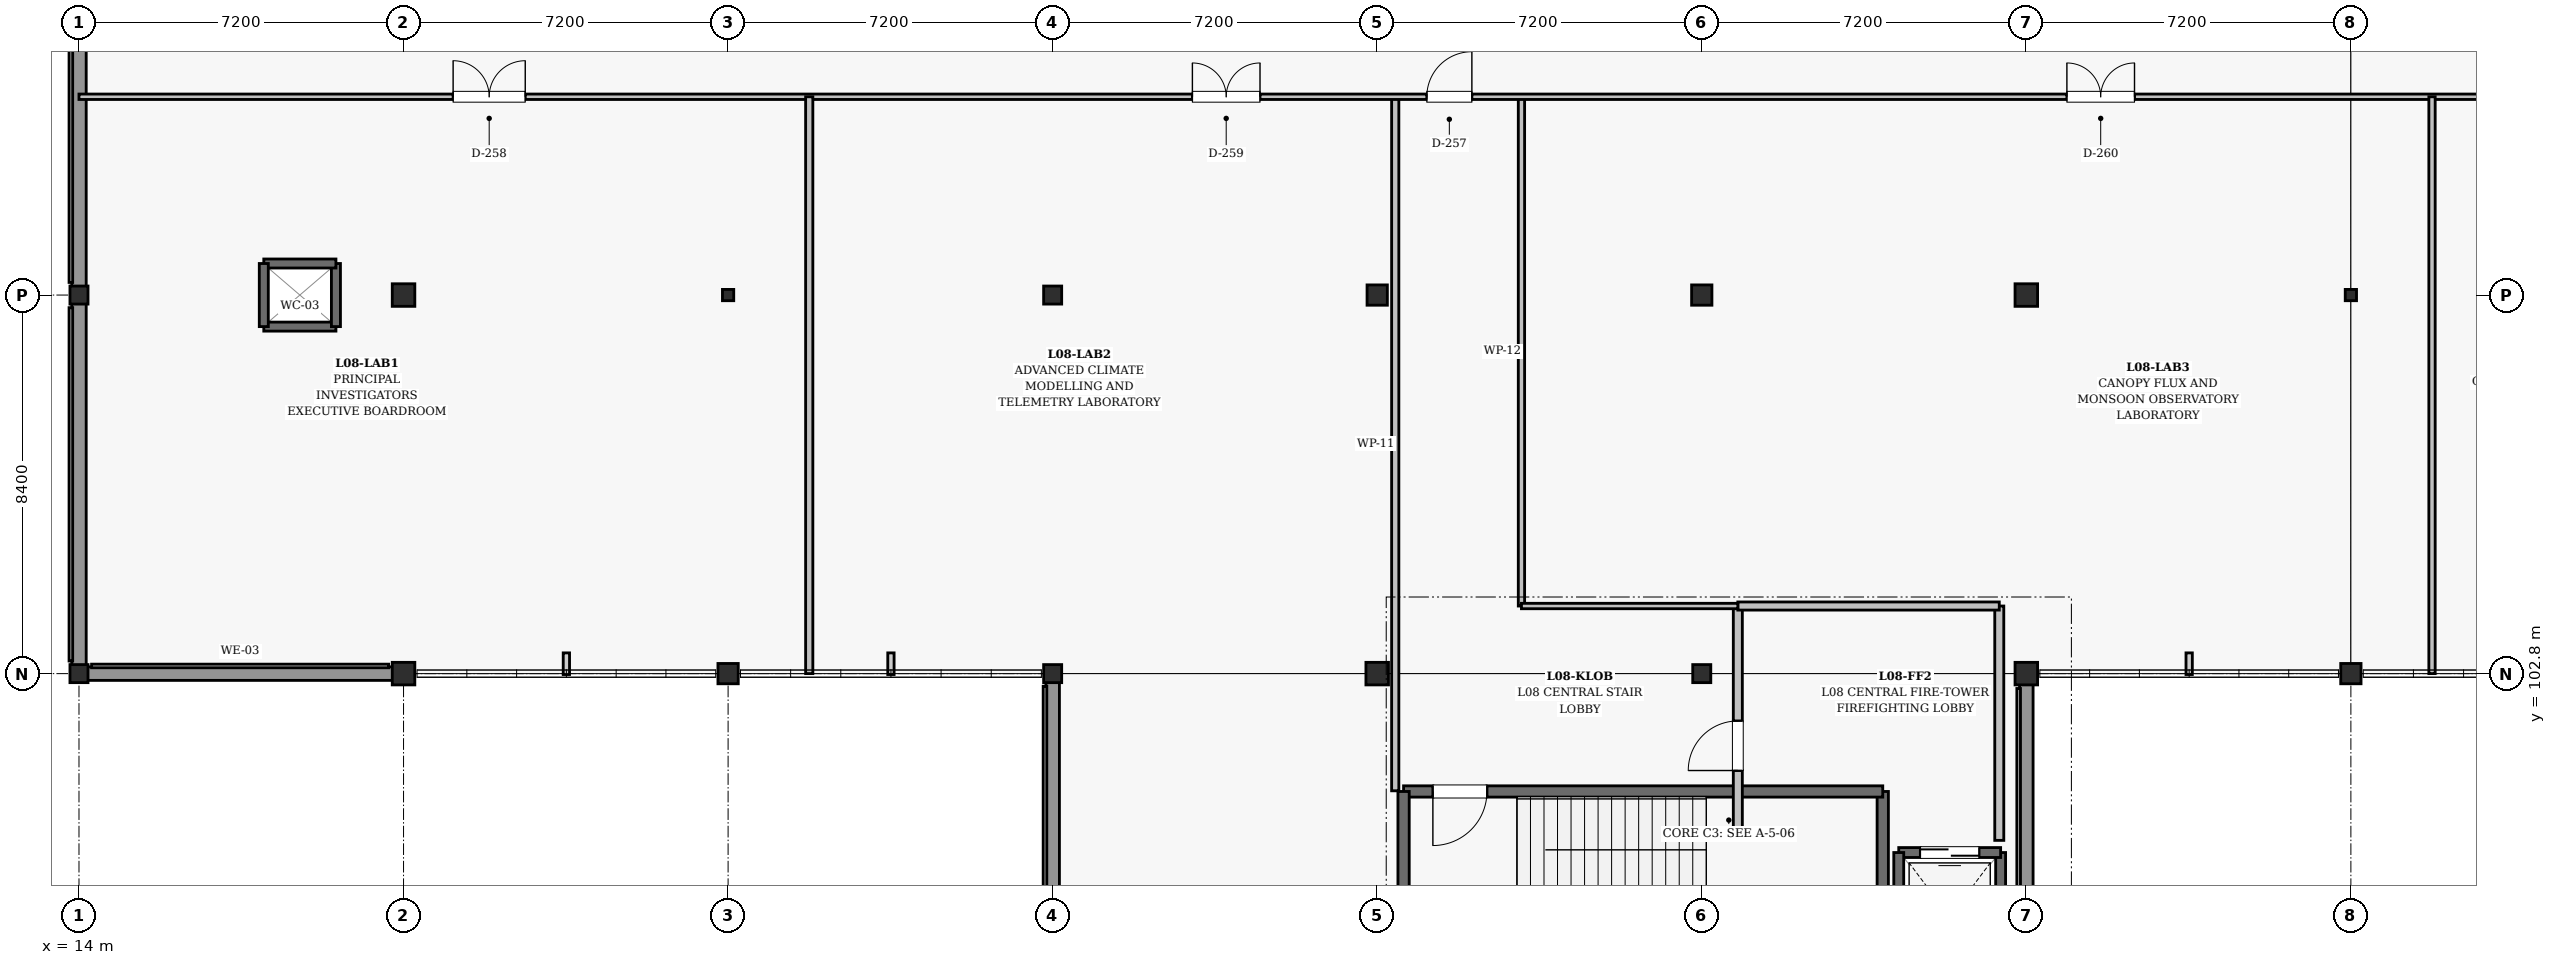
"""IFC4 building model, lengths in metres.
Left out: names, types, materials, properties, quantities, classifications, styles, units other than length and angle.
Written with IfcOpenShell. Run it as: python <this file> out.ifc"""

import sys

from ifc_helpers import new_model, si_unit, direction, frame, frame_2d, origin, origin_2d, place, context, subcontext, project, spatial, rectangle, i_section, extrude, element, fill, save


model = new_model("IFC4")
c1 = context("Model", 3, precision=1e-05, world=origin(), true_north=direction((0.0, 1.0)))
c2 = subcontext(c1, "Body", "Model", "MODEL_VIEW")
j1 = project(units=[si_unit("LENGTHUNIT", "METRE"), si_unit("PLANEANGLEUNIT", "RADIAN")], contexts=[c1])
p1 = place(None, origin())
s1 = spatial("IfcSite", under=j1, at=p1, CompositionType="ELEMENT")
p2 = place(p1, origin())
s2 = spatial("IfcBuilding", under=s1, at=p2, CompositionType="ELEMENT")
p3 = place(p2, frame((0.0, 0.0, 36.9)))
s3 = spatial("IfcBuildingStorey", under=s2, at=p3, CompositionType="ELEMENT", Elevation=36.9)
for number, where, z_axis, x_axis in (
    (1, (14.0, 102.8, 0.0), (0.0, 0.0, 1.0), (1.0, 0.0, 0.0)),
    (2, (14.0, 111.2, 0.0), (0.0, 0.0, 1.0), (1.0, 0.0, 0.0)),
):
    element("IfcColumn", number, at=place(p3, frame(where, z_axis=z_axis, x_axis=x_axis)), inside=s3, PredefinedType="COLUMN", context=c2, shape_type="SweptSolid", body=[
        extrude(rectangle(XDim=0.4, YDim=0.4, at=origin_2d()), origin(), (0.0, 0.0, 1.0), 4.5),
    ])
for number, where, z_axis, x_axis in (
    (3, (21.2, 102.8, 0.0), (0.0, 0.0, 1.0), (1.0, 0.0, 0.0)),
    (4, (21.2, 111.2, 0.0), (0.0, 0.0, 1.0), (1.0, 0.0, 0.0)),
):
    element("IfcColumn", number, at=place(p3, frame(where, z_axis=z_axis, x_axis=x_axis)), inside=s3, PredefinedType="COLUMN", context=c2, shape_type="SweptSolid", body=[
        extrude(rectangle(XDim=0.5, YDim=0.5, at=origin_2d()), origin(), (0.0, 0.0, 1.0), 4.5),
    ])
p4 = place(p3, frame((28.4, 102.8, 0.0), z_axis=(0.0, 0.0, 1.0), x_axis=(1.0, 0.0, 0.0)))
e5 = element("IfcColumn", 5, at=p4, inside=s3, PredefinedType="COLUMN", context=c2, shape_type="SweptSolid", body=[
    extrude(rectangle(XDim=0.45, YDim=0.45, at=origin_2d()), origin(), (0.0, 0.0, 1.0), 4.5),
])
p5 = place(p3, frame((28.4, 111.2, 0.0), z_axis=(0.0, 0.0, 1.0), x_axis=(1.0, 0.0, 0.0)))
e6 = element("IfcColumn", 6, at=p5, inside=s3, PredefinedType="COLUMN", context=c2, shape_type="SweptSolid", body=[
    extrude(i_section(OverallWidth=0.25, OverallDepth=0.25, WebThickness=0.009, FlangeThickness=0.01, FilletRadius=0.01, at=origin_2d()), origin(), (0.0, 0.0, 1.0), 4.5),
])
for number, where, z_axis, x_axis in (
    (7, (35.6, 102.8, 0.0), (0.0, 0.0, 1.0), (1.0, 0.0, 0.0)),
    (8, (35.6, 111.2, 0.0), (0.0, 0.0, 1.0), (1.0, 0.0, 0.0)),
):
    element("IfcColumn", number, at=place(p3, frame(where, z_axis=z_axis, x_axis=x_axis)), inside=s3, PredefinedType="COLUMN", context=c2, shape_type="SweptSolid", body=[
        extrude(rectangle(XDim=0.4, YDim=0.4, at=origin_2d()), origin(), (0.0, 0.0, 1.0), 4.5),
    ])
p6 = place(p3, frame((42.8, 102.8, 0.0), z_axis=(0.0, 0.0, 1.0), x_axis=(1.0, 0.0, 0.0)))
e9 = element("IfcColumn", 9, at=p6, inside=s3, PredefinedType="COLUMN", context=c2, shape_type="SweptSolid", body=[
    extrude(rectangle(XDim=0.5, YDim=0.5, at=origin_2d()), origin(), (0.0, 0.0, 1.0), 4.5),
])
p7 = place(p3, frame((42.8, 111.2, 0.0), z_axis=(0.0, 0.0, 1.0), x_axis=(1.0, 0.0, 0.0)))
e10 = element("IfcColumn", 10, at=p7, inside=s3, PredefinedType="COLUMN", context=c2, shape_type="SweptSolid", body=[
    extrude(rectangle(XDim=0.45, YDim=0.45, at=origin_2d()), origin(), (0.0, 0.0, 1.0), 4.5),
])
p8 = place(p3, frame((50.0, 102.8, 0.0), z_axis=(0.0, 0.0, 1.0), x_axis=(1.0, 0.0, 0.0)))
e11 = element("IfcColumn", 11, at=p8, inside=s3, PredefinedType="COLUMN", context=c2, shape_type="SweptSolid", body=[
    extrude(rectangle(XDim=0.4, YDim=0.4, at=origin_2d()), origin(), (0.0, 0.0, 1.0), 4.5),
])
p9 = place(p3, frame((50.0, 111.2, 0.0), z_axis=(0.0, 0.0, 1.0), x_axis=(1.0, 0.0, 0.0)))
e12 = element("IfcColumn", 12, at=p9, inside=s3, PredefinedType="COLUMN", context=c2, shape_type="SweptSolid", body=[
    extrude(rectangle(XDim=0.45, YDim=0.45, at=origin_2d()), origin(), (0.0, 0.0, 1.0), 4.5),
])
for number, where, z_axis, x_axis in (
    (13, (57.2, 102.8, 0.0), (0.0, 0.0, 1.0), (1.0, 0.0, 0.0)),
    (14, (57.2, 111.2, 0.0), (0.0, 0.0, 1.0), (1.0, 0.0, 0.0)),
):
    element("IfcColumn", number, at=place(p3, frame(where, z_axis=z_axis, x_axis=x_axis)), inside=s3, PredefinedType="COLUMN", context=c2, shape_type="SweptSolid", body=[
        extrude(rectangle(XDim=0.5, YDim=0.5, at=origin_2d()), origin(), (0.0, 0.0, 1.0), 4.5),
    ])
p10 = place(p3, frame((64.4, 102.8, 0.0), z_axis=(0.0, 0.0, 1.0), x_axis=(1.0, 0.0, 0.0)))
e15 = element("IfcColumn", 15, at=p10, inside=s3, PredefinedType="COLUMN", context=c2, shape_type="SweptSolid", body=[
    extrude(rectangle(XDim=0.45, YDim=0.45, at=origin_2d()), origin(), (0.0, 0.0, 1.0), 4.5),
])
p11 = place(p3, frame((64.4, 111.2, 0.0), z_axis=(0.0, 0.0, 1.0), x_axis=(1.0, 0.0, 0.0)))
e16 = element("IfcColumn", 16, at=p11, inside=s3, PredefinedType="COLUMN", context=c2, shape_type="SweptSolid", body=[
    extrude(i_section(OverallWidth=0.25, OverallDepth=0.25, WebThickness=0.009, FlangeThickness=0.01, FilletRadius=0.01, at=origin_2d()), origin(), (0.0, 0.0, 1.0), 4.5),
])
p12 = place(p3, frame((14.18, 102.8, 0.0), z_axis=(0.0, 0.0, 1.0), x_axis=(1.0, 0.0, 0.0)))
e17 = element("IfcWall", 17, at=p12, inside=s3, PredefinedType="SOLIDWALL", context=c2, shape_type="SweptSolid", body=[
    extrude(rectangle(XDim=6.79, YDim=0.3, at=frame_2d((3.395, 0.0))), origin(), (0.0, 0.0, 1.0), 3.355),
])
p13 = place(p3, frame((14.0, 102.98, 0.0), z_axis=(0.0, 0.0, 1.0), x_axis=(0.0, 1.0, 0.0)))
e18 = element("IfcWall", 18, at=p13, inside=s3, PredefinedType="SOLIDWALL", context=c2, shape_type="SweptSolid", body=[
    extrude(rectangle(XDim=8.04, YDim=0.32, at=frame_2d((4.02, 0.0))), origin(), (0.0, 0.0, 1.0), 3.355),
])
p14 = place(p3, frame((14.0, 111.38, 0.0), z_axis=(0.0, 0.0, 1.0), x_axis=(0.0, 1.0, 0.0)))
e19 = element("IfcWall", 19, at=p14, inside=s3, PredefinedType="SOLIDWALL", context=c2, shape_type="SweptSolid", body=[
    extrude(rectangle(XDim=8.015, YDim=0.32, at=frame_2d((4.008, 0.0))), origin(), (0.0, 0.0, 1.0), 3.405),
])
p15 = place(p3, frame((57.2, 94.605, 0.0), z_axis=(0.0, 0.0, 1.0), x_axis=(0.0, 1.0, 0.0)))
e20 = element("IfcWall", 20, at=p15, inside=s3, PredefinedType="SOLIDWALL", context=c2, shape_type="SweptSolid", body=[
    extrude(rectangle(XDim=7.965, YDim=0.3, at=frame_2d((3.982, 0.0))), origin(), (0.0, 0.0, 1.0), 3.355),
])
p16 = place(p3, frame((35.6, 94.63, 0.0), z_axis=(0.0, 0.0, 1.0), x_axis=(0.0, 1.0, 0.0)))
e21 = element("IfcWall", 21, at=p16, inside=s3, PredefinedType="SOLIDWALL", context=c2, shape_type="SweptSolid", body=[
    extrude(rectangle(XDim=7.99, YDim=0.3, at=frame_2d((3.995, 0.0))), origin(), (0.0, 0.0, 1.0), 2.955),
])
p17 = place(p3, frame((54.015, 95.085, 0.0), z_axis=(0.0, 0.0, 1.0), x_axis=(0.0, 1.0, 0.0)))
e22 = element("IfcWall", 22, at=p17, inside=s3, PredefinedType="SHEAR", context=c2, shape_type="SweptSolid", body=[
    extrude(rectangle(XDim=5.1, YDim=0.25, at=frame_2d((2.55, 0.0))), origin(), (0.0, 0.0, 1.0), 4.215),
])
p18 = place(p3, frame((54.015, 100.185, 0.0), z_axis=(0.0, 0.0, 1.0), x_axis=(-1.0, 0.0, 0.0)))
e23 = element("IfcWall", 23, at=p18, inside=s3, PredefinedType="SHEAR", context=c2, shape_type="SweptSolid", body=[
    extrude(rectangle(XDim=10.63, YDim=0.25, at=frame_2d((5.315, 0.0))), origin(), (0.0, 0.0, 1.0), 4.215),
])
p19 = place(p18, frame((8.78, 0.0, 0.0)))
e24 = element("IfcOpeningElement", 24, at=p19, cuts=e23, PredefinedType="OPENING", context=c2, shape_type="SweptSolid", body=[
    extrude(rectangle(XDim=1.2, YDim=2.15, at=frame_2d((0.6, 1.075))), frame((0.0, 0.135, 0.0), z_axis=(0.0, -1.0, 0.0), x_axis=(1.0, 0.0, 0.0)), (0.0, 0.0, 1.0), 0.27),
])
p20 = place(p3, frame((43.385, 100.185, 0.0), z_axis=(0.0, 0.0, 1.0), x_axis=(0.0, -1.0, 0.0)))
e25 = element("IfcWall", 25, at=p20, inside=s3, PredefinedType="SHEAR", context=c2, shape_type="SweptSolid", body=[
    extrude(rectangle(XDim=5.1, YDim=0.25, at=frame_2d((2.55, 0.0))), origin(), (0.0, 0.0, 1.0), 4.215),
])
p21 = place(p3, frame((56.63, 95.97, 0.0), z_axis=(0.0, 0.0, 1.0), x_axis=(0.0, 1.0, 0.0)))
e26 = element("IfcWall", 26, at=p21, inside=s3, PredefinedType="SHEAR", context=c2, shape_type="SweptSolid", body=[
    extrude(rectangle(XDim=2.86, YDim=0.22, at=frame_2d((1.43, 0.0))), origin(), (0.0, 0.0, 1.0), 4.215),
])
p22 = place(p3, frame((56.63, 98.83, 0.0), z_axis=(0.0, 0.0, 1.0), x_axis=(-1.0, 0.0, 0.0)))
e27 = element("IfcWall", 27, at=p22, inside=s3, PredefinedType="SHEAR", context=c2, shape_type="SweptSolid", body=[
    extrude(rectangle(XDim=2.26, YDim=0.22, at=frame_2d((1.13, 0.0))), origin(), (0.0, 0.0, 1.0), 4.215),
])
p23 = place(p22, frame((0.48, 0.0, 0.0)))
e28 = element("IfcOpeningElement", 28, at=p23, cuts=e27, PredefinedType="OPENING", context=c2, shape_type="SweptSolid", body=[
    extrude(rectangle(XDim=1.3, YDim=2.2, at=frame_2d((0.65, 1.1))), frame((0.0, 0.12, 0.0), z_axis=(0.0, -1.0, 0.0), x_axis=(1.0, 0.0, 0.0)), (0.0, 0.0, 1.0), 0.24),
])
p24 = place(p3, frame((54.37, 98.83, 0.0), z_axis=(0.0, 0.0, 1.0), x_axis=(0.0, -1.0, 0.0)))
e29 = element("IfcWall", 29, at=p24, inside=s3, PredefinedType="SHEAR", context=c2, shape_type="SweptSolid", body=[
    extrude(rectangle(XDim=2.86, YDim=0.22, at=frame_2d((1.43, 0.0))), origin(), (0.0, 0.0, 1.0), 4.215),
])
p25 = place(p3, frame((18.1, 110.5, 0.0), z_axis=(0.0, 0.0, 1.0), x_axis=(1.0, 0.0, 0.0)))
e30 = element("IfcWall", 30, at=p25, inside=s3, PredefinedType="SHEAR", context=c2, shape_type="SweptSolid", body=[
    extrude(rectangle(XDim=1.6, YDim=0.2, at=frame_2d((0.8, 0.0))), origin(), (0.0, 0.0, 1.0), 4.14),
])
p26 = place(p3, frame((19.7, 110.5, 0.0), z_axis=(0.0, 0.0, 1.0), x_axis=(0.0, 1.0, 0.0)))
e31 = element("IfcWall", 31, at=p26, inside=s3, PredefinedType="SHEAR", context=c2, shape_type="SweptSolid", body=[
    extrude(rectangle(XDim=1.4, YDim=0.2, at=frame_2d((0.7, 0.0))), origin(), (0.0, 0.0, 1.0), 4.14),
])
p27 = place(p3, frame((19.7, 111.9, 0.0), z_axis=(0.0, 0.0, 1.0), x_axis=(-1.0, 0.0, 0.0)))
e32 = element("IfcWall", 32, at=p27, inside=s3, PredefinedType="SHEAR", context=c2, shape_type="SweptSolid", body=[
    extrude(rectangle(XDim=1.6, YDim=0.2, at=frame_2d((0.8, 0.0))), origin(), (0.0, 0.0, 1.0), 4.14),
])
p28 = place(p3, frame((18.1, 111.9, 0.0), z_axis=(0.0, 0.0, 1.0), x_axis=(0.0, -1.0, 0.0)))
e33 = element("IfcWall", 33, at=p28, inside=s3, PredefinedType="SHEAR", context=c2, shape_type="SweptSolid", body=[
    extrude(rectangle(XDim=1.4, YDim=0.2, at=frame_2d((0.7, 0.0))), origin(), (0.0, 0.0, 1.0), 4.14),
])
p29 = place(p3, frame((50.8, 99.1, 0.0), z_axis=(0.0, 0.0, 1.0), x_axis=(0.0, 1.0, 0.0)))
e34 = element("IfcWall", 34, at=p29, inside=s3, PredefinedType="SOLIDWALL", context=c2, shape_type="SweptSolid", body=[
    extrude(rectangle(XDim=5.2, YDim=0.2, at=frame_2d((2.6, 0.0))), origin(), (0.0, 0.0, 1.0), 3.36),
])
p30 = place(p29, frame((1.55, 0.0, 0.0)))
e35 = element("IfcOpeningElement", 35, at=p30, cuts=e34, PredefinedType="OPENING", context=c2, shape_type="SweptSolid", body=[
    extrude(rectangle(XDim=1.1, YDim=2.15, at=frame_2d((0.55, 1.075))), frame((0.0, 0.11, 0.0), z_axis=(0.0, -1.0, 0.0), x_axis=(1.0, 0.0, 0.0)), (0.0, 0.0, 1.0), 0.22),
])
p31 = place(p3, frame((56.6, 99.1, 0.0), z_axis=(0.0, 0.0, 1.0), x_axis=(0.0, 1.0, 0.0)))
e36 = element("IfcWall", 36, at=p31, inside=s3, PredefinedType="SOLIDWALL", context=c2, shape_type="SweptSolid", body=[
    extrude(rectangle(XDim=5.2, YDim=0.2, at=frame_2d((2.6, 0.0))), origin(), (0.0, 0.0, 1.0), 3.36),
])
p32 = place(p3, frame((50.8, 104.3, 0.0), z_axis=(0.0, 0.0, 1.0), x_axis=(1.0, 0.0, 0.0)))
e37 = element("IfcWall", 37, at=p32, inside=s3, PredefinedType="SOLIDWALL", context=c2, shape_type="SweptSolid", body=[
    extrude(rectangle(XDim=5.8, YDim=0.18, at=frame_2d((2.9, 0.0))), origin(), (0.0, 0.0, 1.0), 4.12),
])
p33 = place(p3, frame((43.2, 100.2, 0.0), z_axis=(0.0, 0.0, 1.0), x_axis=(0.0, 1.0, 0.0)))
e38 = element("IfcWall", 38, at=p33, inside=s3, PredefinedType="PARTITIONING", context=c2, shape_type="SweptSolid", body=[
    extrude(rectangle(XDim=15.4, YDim=0.16, at=frame_2d((7.7, 0.0))), origin(), (0.0, 0.0, 1.0), 2.96),
])
p34 = place(p3, frame((46.0, 104.3, 0.0), z_axis=(0.0, 0.0, 1.0), x_axis=(0.0, 1.0, 0.0)))
e39 = element("IfcWall", 39, at=p34, inside=s3, PredefinedType="PARTITIONING", context=c2, shape_type="SweptSolid", body=[
    extrude(rectangle(XDim=11.3, YDim=0.14, at=frame_2d((5.65, 0.0))), origin(), (0.0, 0.0, 1.0), 3.52),
])
p35 = place(p3, frame((46.0, 104.3, 0.0), z_axis=(0.0, 0.0, 1.0), x_axis=(1.0, 0.0, 0.0)))
e40 = element("IfcWall", 40, at=p35, inside=s3, PredefinedType="PARTITIONING", context=c2, shape_type="SweptSolid", body=[
    extrude(rectangle(XDim=4.8, YDim=0.12, at=frame_2d((2.4, 0.0))), origin(), (0.0, 0.0, 1.0), 3.31),
])
p36 = place(p3, frame((14.0, 115.6, 0.0), z_axis=(0.0, 0.0, 1.0), x_axis=(1.0, 0.0, 0.0)))
e41 = element("IfcWall", 41, at=p36, inside=s3, PredefinedType="PARTITIONING", context=c2, shape_type="SweptSolid", body=[
    extrude(rectangle(XDim=72.0, YDim=0.12, at=frame_2d((36.0, 0.0))), origin(), (0.0, 0.0, 1.0), 2.96),
])
p37 = place(p36, frame((29.9, 0.0, 0.0)))
e42 = element("IfcOpeningElement", 42, at=p37, cuts=e41, PredefinedType="OPENING", context=c2, shape_type="SweptSolid", body=[
    extrude(rectangle(XDim=1.0, YDim=2.15, at=frame_2d((0.5, 1.075))), frame((0.0, 0.07, 0.0), z_axis=(0.0, -1.0, 0.0), x_axis=(1.0, 0.0, 0.0)), (0.0, 0.0, 1.0), 0.14),
])
p38 = place(p36, frame((8.3, 0.0, 0.0)))
e43 = element("IfcOpeningElement", 43, at=p38, cuts=e41, PredefinedType="OPENING", context=c2, shape_type="SweptSolid", body=[
    extrude(rectangle(XDim=1.6, YDim=2.25, at=frame_2d((0.8, 1.125))), frame((0.0, 0.07, 0.0), z_axis=(0.0, -1.0, 0.0), x_axis=(1.0, 0.0, 0.0)), (0.0, 0.0, 1.0), 0.14),
])
p39 = place(p36, frame((24.7, 0.0, 0.0)))
e44 = element("IfcOpeningElement", 44, at=p39, cuts=e41, PredefinedType="OPENING", context=c2, shape_type="SweptSolid", body=[
    extrude(rectangle(XDim=1.5, YDim=2.25, at=frame_2d((0.75, 1.125))), frame((0.0, 0.07, 0.0), z_axis=(0.0, -1.0, 0.0), x_axis=(1.0, 0.0, 0.0)), (0.0, 0.0, 1.0), 0.14),
])
p40 = place(p36, frame((44.1, 0.0, 0.0)))
e45 = element("IfcOpeningElement", 45, at=p40, cuts=e41, PredefinedType="OPENING", context=c2, shape_type="SweptSolid", body=[
    extrude(rectangle(XDim=1.5, YDim=2.25, at=frame_2d((0.75, 1.125))), frame((0.0, 0.07, 0.0), z_axis=(0.0, -1.0, 0.0), x_axis=(1.0, 0.0, 0.0)), (0.0, 0.0, 1.0), 0.14),
])
p41 = place(p36, frame((59.1, 0.0, 0.0)))
e46 = element("IfcOpeningElement", 46, at=p41, cuts=e41, PredefinedType="OPENING", context=c2, shape_type="SweptSolid", body=[
    extrude(rectangle(XDim=1.35, YDim=2.2, at=frame_2d((0.675, 1.1))), frame((0.0, 0.07, 0.0), z_axis=(0.0, -1.0, 0.0), x_axis=(1.0, 0.0, 0.0)), (0.0, 0.0, 1.0), 0.14),
])
p42 = place(p36, frame((66.8, 0.0, 0.0)))
e47 = element("IfcOpeningElement", 47, at=p42, cuts=e41, PredefinedType="OPENING", context=c2, shape_type="SweptSolid", body=[
    extrude(rectangle(XDim=1.0, YDim=2.15, at=frame_2d((0.5, 1.075))), frame((0.0, 0.07, 0.0), z_axis=(0.0, -1.0, 0.0), x_axis=(1.0, 0.0, 0.0)), (0.0, 0.0, 1.0), 0.14),
])
p43 = place(p3, frame((30.2, 102.8, 0.0), z_axis=(0.0, 0.0, 1.0), x_axis=(0.0, 1.0, 0.0)))
e48 = element("IfcWall", 48, at=p43, inside=s3, PredefinedType="PARTITIONING", context=c2, shape_type="SweptSolid", body=[
    extrude(rectangle(XDim=12.8, YDim=0.16, at=frame_2d((6.4, 0.0))), origin(), (0.0, 0.0, 1.0), 3.41),
])
p44 = place(p3, frame((66.2, 102.8, 0.0), z_axis=(0.0, 0.0, 1.0), x_axis=(0.0, 1.0, 0.0)))
e49 = element("IfcWall", 49, at=p44, inside=s3, PredefinedType="PARTITIONING", context=c2, shape_type="SweptSolid", body=[
    extrude(rectangle(XDim=12.8, YDim=0.14, at=frame_2d((6.4, 0.0))), origin(), (0.0, 0.0, 1.0), 3.41),
])
p45 = place(p19, origin())
e50 = element("IfcDoor", 50, at=p45, inside=s3, OperationType="SINGLE_SWING_RIGHT", PredefinedType="DOOR", context=c2, shape_type="SweptSolid", body=[
    extrude(rectangle(XDim=1.2, YDim=2.15, at=frame_2d((0.6, 1.075))), frame((0.0, 0.025, 0.0), z_axis=(0.0, -1.0, 0.0), x_axis=(1.0, 0.0, 0.0)), (0.0, 0.0, 1.0), 0.05),
])
fill(e24, e50)
p46 = place(p23, origin())
e51 = element("IfcDoor", 51, at=p46, inside=s3, OperationType="DOUBLE_DOOR_SLIDING", PredefinedType="DOOR", context=c2, shape_type="SweptSolid", body=[
    extrude(rectangle(XDim=1.3, YDim=2.2, at=frame_2d((0.65, 1.1))), frame((0.0, 0.025, 0.0), z_axis=(0.0, -1.0, 0.0), x_axis=(1.0, 0.0, 0.0)), (0.0, 0.0, 1.0), 0.05),
])
fill(e28, e51)
p47 = place(p30, origin())
e52 = element("IfcDoor", 52, at=p47, inside=s3, OperationType="SINGLE_SWING_LEFT", PredefinedType="DOOR", context=c2, shape_type="SweptSolid", body=[
    extrude(rectangle(XDim=1.1, YDim=2.15, at=frame_2d((0.55, 1.075))), frame((0.0, 0.025, 0.0), z_axis=(0.0, -1.0, 0.0), x_axis=(1.0, 0.0, 0.0)), (0.0, 0.0, 1.0), 0.05),
])
fill(e35, e52)
p48 = place(p37, origin())
e53 = element("IfcDoor", 53, at=p48, inside=s3, OperationType="SINGLE_SWING_RIGHT", PredefinedType="DOOR", context=c2, shape_type="SweptSolid", body=[
    extrude(rectangle(XDim=1.0, YDim=2.15, at=frame_2d((0.5, 1.075))), frame((0.0, 0.025, 0.0), z_axis=(0.0, -1.0, 0.0), x_axis=(1.0, 0.0, 0.0)), (0.0, 0.0, 1.0), 0.05),
])
fill(e42, e53)
p49 = place(p38, origin())
e54 = element("IfcDoor", 54, at=p49, inside=s3, OperationType="DOUBLE_DOOR_SINGLE_SWING", PredefinedType="DOOR", context=c2, shape_type="SweptSolid", body=[
    extrude(rectangle(XDim=1.6, YDim=2.25, at=frame_2d((0.8, 1.125))), frame((0.0, 0.025, 0.0), z_axis=(0.0, -1.0, 0.0), x_axis=(1.0, 0.0, 0.0)), (0.0, 0.0, 1.0), 0.05),
])
fill(e43, e54)
p50 = place(p39, origin())
e55 = element("IfcDoor", 55, at=p50, inside=s3, OperationType="DOUBLE_DOOR_SINGLE_SWING", PredefinedType="DOOR", context=c2, shape_type="SweptSolid", body=[
    extrude(rectangle(XDim=1.5, YDim=2.25, at=frame_2d((0.75, 1.125))), frame((0.0, 0.025, 0.0), z_axis=(0.0, -1.0, 0.0), x_axis=(1.0, 0.0, 0.0)), (0.0, 0.0, 1.0), 0.05),
])
fill(e44, e55)
p51 = place(p40, origin())
e56 = element("IfcDoor", 56, at=p51, inside=s3, OperationType="DOUBLE_DOOR_SINGLE_SWING", PredefinedType="DOOR", context=c2, shape_type="SweptSolid", body=[
    extrude(rectangle(XDim=1.5, YDim=2.25, at=frame_2d((0.75, 1.125))), frame((0.0, 0.025, 0.0), z_axis=(0.0, -1.0, 0.0), x_axis=(1.0, 0.0, 0.0)), (0.0, 0.0, 1.0), 0.05),
])
fill(e45, e56)
save(model, sys.argv[1])
